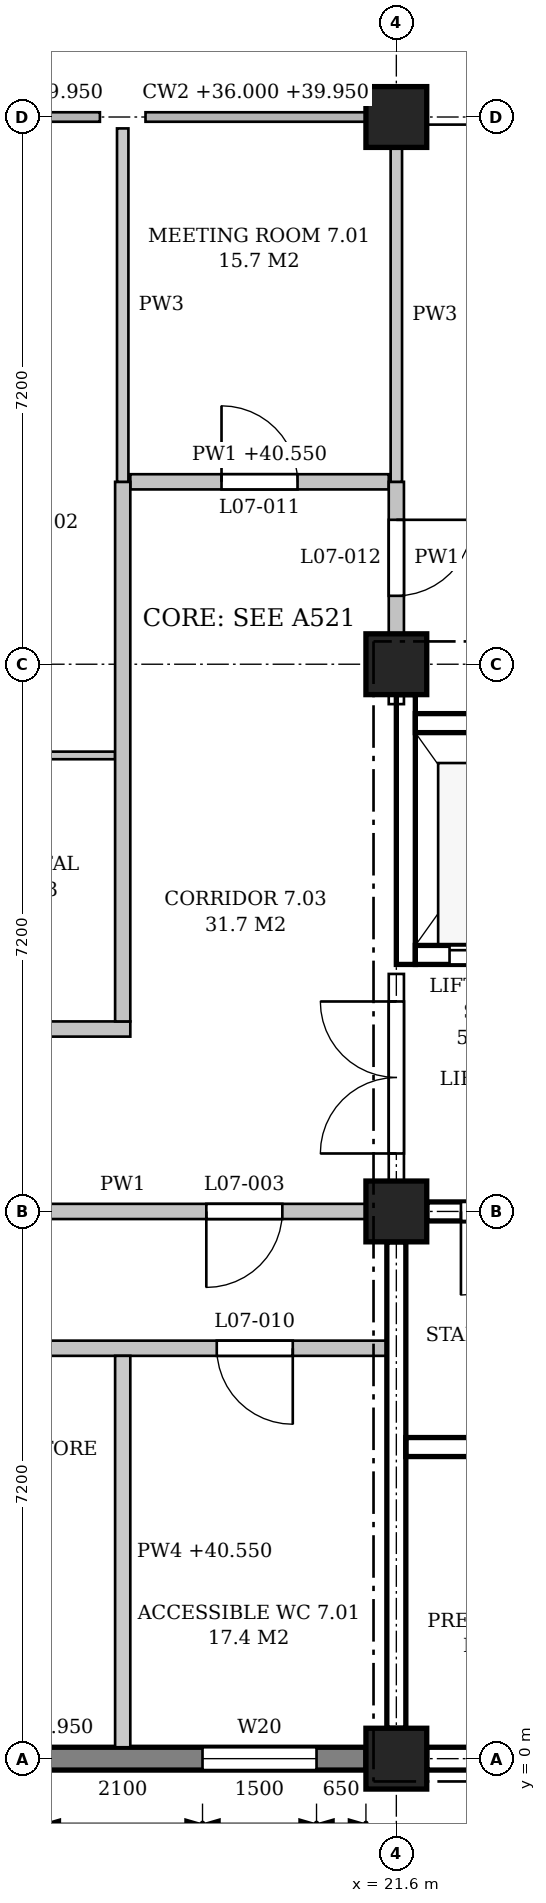
"""IFC4 building model, lengths in metres.
Left out: names, types, materials, properties, quantities, classifications, styles, units other than length and angle.
Written with IfcOpenShell. Run it as: python <this file> out.ifc"""

import sys

from ifc_helpers import new_model, si_unit, direction, frame, frame_2d, origin, origin_2d, place, context, subcontext, project, spatial, polyline, rectangle, outline, extrude, element, fill, save


model = new_model("IFC4")
c1 = context("Model", 3, precision=1e-05, world=origin(), true_north=direction((0.0, 1.0)))
c2 = subcontext(c1, "Body", "Model", "MODEL_VIEW")
j1 = project(units=[si_unit("LENGTHUNIT", "METRE"), si_unit("PLANEANGLEUNIT", "RADIAN")], contexts=[c1])
p1 = place(None, origin())
s1 = spatial("IfcSite", under=j1, at=p1, CompositionType="ELEMENT")
p2 = place(p1, origin())
s2 = spatial("IfcBuilding", under=s1, at=p2, CompositionType="ELEMENT")
p3 = place(p2, frame((0.0, 0.0, 36.0)))
s3 = spatial("IfcBuildingStorey", under=s2, at=p3, CompositionType="ELEMENT", Elevation=36.0)
for number, where, z_axis, x_axis in (
    (1, (21.6, 0.0, 0.0), (0.0, 0.0, 1.0), (1.0, 0.0, 0.0)),
    (2, (21.6, 7.2, 0.0), (0.0, 0.0, 1.0), (1.0, 0.0, 0.0)),
    (3, (21.6, 14.4, 0.0), (0.0, 0.0, 1.0), (1.0, 0.0, 0.0)),
    (4, (21.6, 21.6, 0.0), (0.0, 0.0, 1.0), (1.0, 0.0, 0.0)),
):
    element("IfcColumn", number, at=place(p3, frame(where, z_axis=z_axis, x_axis=x_axis)), inside=s3, PredefinedType="COLUMN", context=c2, shape_type="SweptSolid", body=[
        extrude(rectangle(XDim=0.8, YDim=0.8, at=origin_2d()), origin(), (0.0, 0.0, 1.0), 4.8),
    ])
p4 = place(p3, frame((14.8, 0.0, 0.0), z_axis=(0.0, 0.0, 1.0), x_axis=(1.0, 0.0, 0.0)))
e5 = element("IfcWall", 5, at=p4, inside=s3, PredefinedType="STANDARD", context=c2, shape_type="SweptSolid", body=[
    extrude(rectangle(XDim=6.4, YDim=0.3, at=frame_2d((3.2, 0.0))), origin(), (0.0, 0.0, 1.0), 3.95),
])
p5 = place(p4, frame((0.65, 0.0, 0.9)))
e6 = element("IfcOpeningElement", 6, at=p5, cuts=e5, PredefinedType="OPENING", context=c2, shape_type="SweptSolid", body=[
    extrude(outline(polyline([(0.0, 0.0), (1.5, 0.0), (1.5, 2.25), (0.75, 3.0), (0.0, 2.25), (0.0, 0.0)])), frame((0.0, 0.16, 0.0), z_axis=(0.0, -1.0, 0.0), x_axis=(1.0, 0.0, 0.0)), (0.0, 0.0, 1.0), 0.32),
])
p6 = place(p4, frame((4.25, 0.0, 0.9)))
e7 = element("IfcOpeningElement", 7, at=p6, cuts=e5, PredefinedType="OPENING", context=c2, shape_type="SweptSolid", body=[
    extrude(outline(polyline([(0.0, 0.0), (1.5, 0.0), (1.5, 2.25), (0.75, 3.0), (0.0, 2.25), (0.0, 0.0)])), frame((0.0, 0.16, 0.0), z_axis=(0.0, -1.0, 0.0), x_axis=(1.0, 0.0, 0.0)), (0.0, 0.0, 1.0), 0.32),
])
p7 = place(p3, frame((22.0, 0.0, 0.0), z_axis=(0.0, 0.0, 1.0), x_axis=(1.0, 0.0, 0.0)))
e8 = element("IfcWall", 8, at=p7, inside=s3, PredefinedType="STANDARD", context=c2, shape_type="SweptSolid", body=[
    extrude(rectangle(XDim=6.4, YDim=0.3, at=frame_2d((3.2, 0.0))), origin(), (0.0, 0.0, 1.0), 3.95),
])
p8 = place(p7, frame((4.55, 0.0, 0.9)))
e9 = element("IfcOpeningElement", 9, at=p8, cuts=e8, PredefinedType="OPENING", context=c2, shape_type="SweptSolid", body=[
    extrude(outline(polyline([(0.0, 0.0), (0.9, 0.0), (0.9, 2.55), (0.45, 3.0), (0.0, 2.55), (0.0, 0.0)])), frame((0.0, 0.16, 0.0), z_axis=(0.0, -1.0, 0.0), x_axis=(1.0, 0.0, 0.0)), (0.0, 0.0, 1.0), 0.32),
])
p9 = place(p3, frame((22.0, 7.2, 0.0), z_axis=(0.0, 0.0, 1.0), x_axis=(1.0, 0.0, 0.0)))
e10 = element("IfcWall", 10, at=p9, inside=s3, PredefinedType="SHEAR", context=c2, shape_type="SweptSolid", body=[
    extrude(rectangle(XDim=6.4, YDim=0.25, at=frame_2d((3.2, 0.0))), origin(), (0.0, 0.0, 1.0), 3.85),
])
p10 = place(p9, frame((0.45, 0.0, 0.0)))
e11 = element("IfcOpeningElement", 11, at=p10, cuts=e10, PredefinedType="OPENING", context=c2, shape_type="SweptSolid", body=[
    extrude(rectangle(XDim=1.1, YDim=2.1, at=frame_2d((0.55, 1.05))), frame((0.0, 0.135, 0.0), z_axis=(0.0, -1.0, 0.0), x_axis=(1.0, 0.0, 0.0)), (0.0, 0.0, 1.0), 0.27),
])
p11 = place(p3, frame((21.6, 0.4, 0.0), z_axis=(0.0, 0.0, 1.0), x_axis=(0.0, 1.0, 0.0)))
e12 = element("IfcWall", 12, at=p11, inside=s3, PredefinedType="SHEAR", context=c2, shape_type="SweptSolid", body=[
    extrude(rectangle(XDim=6.4, YDim=0.25, at=frame_2d((3.2, 0.0))), origin(), (0.0, 0.0, 1.0), 3.85),
])
p12 = place(p3, frame((21.725, 4.1, 0.0), z_axis=(0.0, 0.0, 1.0), x_axis=(1.0, 0.0, 0.0)))
e13 = element("IfcWall", 13, at=p12, inside=s3, PredefinedType="SHEAR", context=c2, shape_type="SweptSolid", body=[
    extrude(rectangle(XDim=2.975, YDim=0.25, at=frame_2d((1.487, 0.0))), origin(), (0.0, 0.0, 1.0), 4.55),
])
p13 = place(p12, frame((1.525, 0.0, 0.0)))
e14 = element("IfcOpeningElement", 14, at=p13, cuts=e13, PredefinedType="OPENING", context=c2, shape_type="SweptSolid", body=[
    extrude(rectangle(XDim=0.9, YDim=2.1, at=frame_2d((0.45, 1.05))), frame((0.0, 0.135, 0.0), z_axis=(0.0, -1.0, 0.0), x_axis=(1.0, 0.0, 0.0)), (0.0, 0.0, 1.0), 0.27),
])
p14 = place(p3, frame((21.725, 10.45, -0.25), z_axis=(0.0, 0.0, 1.0), x_axis=(0.0, 1.0, 0.0)))
e15 = element("IfcWall", 15, at=p14, inside=s3, PredefinedType="SHEAR", context=c2, shape_type="SweptSolid", body=[
    extrude(rectangle(XDim=3.55, YDim=0.25, at=frame_2d((1.775, 0.0))), origin(), (0.0, 0.0, 1.0), 4.1),
])
p15 = place(p3, frame((21.85, 10.575, -0.25), z_axis=(0.0, 0.0, 1.0), x_axis=(1.0, 0.0, 0.0)))
e16 = element("IfcWall", 16, at=p15, inside=s3, PredefinedType="SHEAR", context=c2, shape_type="SweptSolid", body=[
    extrude(rectangle(XDim=2.0, YDim=0.25, at=frame_2d((1.0, 0.0))), origin(), (0.0, 0.0, 1.0), 4.8),
])
p16 = place(p15, frame((0.45, 0.0, 0.25)))
e17 = element("IfcOpeningElement", 17, at=p16, cuts=e16, PredefinedType="OPENING", context=c2, shape_type="SweptSolid", body=[
    extrude(rectangle(XDim=1.1, YDim=2.1, at=frame_2d((0.55, 1.05))), frame((0.0, 0.135, 0.0), z_axis=(0.0, -1.0, 0.0), x_axis=(1.0, 0.0, 0.0)), (0.0, 0.0, 1.0), 0.27),
])
p17 = place(p3, frame((21.85, 13.625, -0.25), z_axis=(0.0, 0.0, 1.0), x_axis=(1.0, 0.0, 0.0)))
e18 = element("IfcWall", 18, at=p17, inside=s3, PredefinedType="SHEAR", context=c2, shape_type="SweptSolid", body=[
    extrude(rectangle(XDim=2.0, YDim=0.25, at=frame_2d((1.0, 0.0))), origin(), (0.0, 0.0, 1.0), 4.8),
])
p18 = place(p3, frame((7.325, 5.4, 0.0), z_axis=(0.0, 0.0, 1.0), x_axis=(1.0, 0.0, 0.0)))
e19 = element("IfcWall", 19, at=p18, inside=s3, PredefinedType="PARTITIONING", context=c2, shape_type="SweptSolid", body=[
    extrude(outline(polyline([(0.0, 0.0), (14.15, 0.0), (14.15, 3.85), (14.05, 3.85), (14.05, 4.55), (7.3, 4.55), (7.3, 3.85), (6.85, 3.85), (6.85, 4.55), (0.1, 4.55), (0.1, 3.85), (0.0, 3.85), (0.0, 0.0)])), frame((0.0, 0.1, 0.0), z_axis=(0.0, -1.0, 0.0), x_axis=(1.0, 0.0, 0.0)), (0.0, 0.0, 1.0), 0.2),
])
p19 = place(p18, frame((1.238, 0.0, 0.0)))
e20 = element("IfcOpeningElement", 20, at=p19, cuts=e19, PredefinedType="OPENING", context=c2, shape_type="SweptSolid", body=[
    extrude(rectangle(XDim=1.0, YDim=2.1, at=frame_2d((0.5, 1.05))), frame((0.0, 0.11, 0.0), z_axis=(0.0, -1.0, 0.0), x_axis=(1.0, 0.0, 0.0)), (0.0, 0.0, 1.0), 0.22),
])
p20 = place(p18, frame((4.775, 0.0, 0.0)))
e21 = element("IfcOpeningElement", 21, at=p20, cuts=e19, PredefinedType="OPENING", context=c2, shape_type="SweptSolid", body=[
    extrude(rectangle(XDim=1.0, YDim=2.1, at=frame_2d((0.5, 1.05))), frame((0.0, 0.11, 0.0), z_axis=(0.0, -1.0, 0.0), x_axis=(1.0, 0.0, 0.0)), (0.0, 0.0, 1.0), 0.22),
])
p21 = place(p18, frame((8.375, 0.0, 0.0)))
e22 = element("IfcOpeningElement", 22, at=p21, cuts=e19, PredefinedType="OPENING", context=c2, shape_type="SweptSolid", body=[
    extrude(rectangle(XDim=1.0, YDim=2.1, at=frame_2d((0.5, 1.05))), frame((0.0, 0.11, 0.0), z_axis=(0.0, -1.0, 0.0), x_axis=(1.0, 0.0, 0.0)), (0.0, 0.0, 1.0), 0.22),
])
p22 = place(p18, frame((11.913, 0.0, 0.0)))
e23 = element("IfcOpeningElement", 23, at=p22, cuts=e19, PredefinedType="OPENING", context=c2, shape_type="SweptSolid", body=[
    extrude(rectangle(XDim=1.0, YDim=2.1, at=frame_2d((0.5, 1.05))), frame((0.0, 0.11, 0.0), z_axis=(0.0, -1.0, 0.0), x_axis=(1.0, 0.0, 0.0)), (0.0, 0.0, 1.0), 0.22),
])
p23 = place(p3, frame((14.8, 7.2, 0.0), z_axis=(0.0, 0.0, 1.0), x_axis=(1.0, 0.0, 0.0)))
e24 = element("IfcWall", 24, at=p23, inside=s3, PredefinedType="PARTITIONING", context=c2, shape_type="SweptSolid", body=[
    extrude(rectangle(XDim=6.4, YDim=0.2, at=frame_2d((3.2, 0.0))), origin(), (0.0, 0.0, 1.0), 3.85),
])
p24 = place(p23, frame((4.3, 0.0, 0.0)))
e25 = element("IfcOpeningElement", 25, at=p24, cuts=e24, PredefinedType="OPENING", context=c2, shape_type="SweptSolid", body=[
    extrude(rectangle(XDim=1.0, YDim=2.1, at=frame_2d((0.5, 1.05))), frame((0.0, 0.11, 0.0), z_axis=(0.0, -1.0, 0.0), x_axis=(1.0, 0.0, 0.0)), (0.0, 0.0, 1.0), 0.22),
])
p25 = place(p3, frame((3.5, 9.6, 0.0), z_axis=(0.0, 0.0, 1.0), x_axis=(1.0, 0.0, 0.0)))
e26 = element("IfcWall", 26, at=p25, inside=s3, PredefinedType="PARTITIONING", context=c2, shape_type="SweptSolid", body=[
    extrude(outline(polyline([(0.0, 0.0), (14.6, 0.0), (14.6, 4.55), (11.125, 4.55), (11.125, 3.85), (10.675, 3.85), (10.675, 4.55), (3.925, 4.55), (3.925, 3.85), (3.475, 3.85), (3.475, 4.55), (0.0, 4.55), (0.0, 0.0)])), frame((0.0, 0.1, 0.0), z_axis=(0.0, -1.0, 0.0), x_axis=(1.0, 0.0, 0.0)), (0.0, 0.0, 1.0), 0.2),
])
p26 = place(p25, frame((1.4, 0.0, 0.0)))
e27 = element("IfcOpeningElement", 27, at=p26, cuts=e26, PredefinedType="OPENING", context=c2, shape_type="SweptSolid", body=[
    extrude(rectangle(XDim=1.0, YDim=2.1, at=frame_2d((0.5, 1.05))), frame((0.0, 0.11, 0.0), z_axis=(0.0, -1.0, 0.0), x_axis=(1.0, 0.0, 0.0)), (0.0, 0.0, 1.0), 0.22),
])
p27 = place(p25, frame((5.0, 0.0, 0.0)))
e28 = element("IfcOpeningElement", 28, at=p27, cuts=e26, PredefinedType="OPENING", context=c2, shape_type="SweptSolid", body=[
    extrude(rectangle(XDim=1.0, YDim=2.1, at=frame_2d((0.5, 1.05))), frame((0.0, 0.11, 0.0), z_axis=(0.0, -1.0, 0.0), x_axis=(1.0, 0.0, 0.0)), (0.0, 0.0, 1.0), 0.22),
])
p28 = place(p25, frame((10.4, 0.0, 0.0)))
e29 = element("IfcOpeningElement", 29, at=p28, cuts=e26, PredefinedType="OPENING", context=c2, shape_type="SweptSolid", body=[
    extrude(rectangle(XDim=1.0, YDim=2.1, at=frame_2d((0.5, 1.05))), frame((0.0, 0.11, 0.0), z_axis=(0.0, -1.0, 0.0), x_axis=(1.0, 0.0, 0.0)), (0.0, 0.0, 1.0), 0.22),
])
p29 = place(p3, frame((10.875, 13.2, 0.0), z_axis=(0.0, 0.0, 1.0), x_axis=(1.0, 0.0, 0.0)))
e30 = element("IfcWall", 30, at=p29, inside=s3, PredefinedType="PARTITIONING", context=c2, shape_type="SweptSolid", body=[
    extrude(rectangle(XDim=7.025, YDim=0.1, at=frame_2d((3.512, 0.0))), origin(), (0.0, 0.0, 1.0), 3.85),
])
p30 = place(p29, frame((1.262, 0.0, 0.0)))
e31 = element("IfcOpeningElement", 31, at=p30, cuts=e30, PredefinedType="OPENING", context=c2, shape_type="SweptSolid", body=[
    extrude(rectangle(XDim=1.0, YDim=2.1, at=frame_2d((0.5, 1.05))), frame((0.0, 0.06, 0.0), z_axis=(0.0, -1.0, 0.0), x_axis=(1.0, 0.0, 0.0)), (0.0, 0.0, 1.0), 0.12),
])
p31 = place(p29, frame((4.775, 0.0, 0.0)))
e32 = element("IfcOpeningElement", 32, at=p31, cuts=e30, PredefinedType="OPENING", context=c2, shape_type="SweptSolid", body=[
    extrude(rectangle(XDim=1.0, YDim=2.1, at=frame_2d((0.5, 1.05))), frame((0.0, 0.06, 0.0), z_axis=(0.0, -1.0, 0.0), x_axis=(1.0, 0.0, 0.0)), (0.0, 0.0, 1.0), 0.12),
])
p32 = place(p3, frame((18.1, 16.8, 0.0), z_axis=(0.0, 0.0, 1.0), x_axis=(1.0, 0.0, 0.0)))
e33 = element("IfcWall", 33, at=p32, inside=s3, PredefinedType="PARTITIONING", context=c2, shape_type="SweptSolid", body=[
    extrude(outline(polyline([(0.0, 0.0), (3.4, 0.0), (3.4, 3.85), (3.275, 3.85), (3.275, 4.55), (0.0, 4.55), (0.0, 0.0)])), frame((0.0, 0.1, 0.0), z_axis=(0.0, -1.0, 0.0), x_axis=(1.0, 0.0, 0.0)), (0.0, 0.0, 1.0), 0.2),
])
p33 = place(p32, frame((1.2, 0.0, 0.0)))
e34 = element("IfcOpeningElement", 34, at=p33, cuts=e33, PredefinedType="OPENING", context=c2, shape_type="SweptSolid", body=[
    extrude(rectangle(XDim=1.0, YDim=2.1, at=frame_2d((0.5, 1.05))), frame((0.0, 0.11, 0.0), z_axis=(0.0, -1.0, 0.0), x_axis=(1.0, 0.0, 0.0)), (0.0, 0.0, 1.0), 0.22),
])
p34 = place(p3, frame((18.0, 0.15, 0.0), z_axis=(0.0, 0.0, 1.0), x_axis=(0.0, 1.0, 0.0)))
e35 = element("IfcWall", 35, at=p34, inside=s3, PredefinedType="PARTITIONING", context=c2, shape_type="SweptSolid", body=[
    extrude(outline(polyline([(0.0, 0.0), (5.15, 0.0), (5.15, 4.55), (0.05, 4.55), (0.05, 3.95), (0.0, 3.95), (0.0, 0.0)])), frame((0.0, 0.1, 0.0), z_axis=(0.0, -1.0, 0.0), x_axis=(1.0, 0.0, 0.0)), (0.0, 0.0, 1.0), 0.2),
])
p35 = place(p3, frame((18.0, 9.7, 0.0), z_axis=(0.0, 0.0, 1.0), x_axis=(0.0, 1.0, 0.0)))
e36 = element("IfcWall", 36, at=p35, inside=s3, PredefinedType="PARTITIONING", context=c2, shape_type="SweptSolid", body=[
    extrude(outline(polyline([(0.0, 0.0), (7.1, 0.0), (7.1, 4.55), (4.925, 4.55), (4.925, 3.85), (4.475, 3.85), (4.475, 4.55), (0.0, 4.55), (0.0, 0.0)])), frame((0.0, 0.1, 0.0), z_axis=(0.0, -1.0, 0.0), x_axis=(1.0, 0.0, 0.0)), (0.0, 0.0, 1.0), 0.2),
])
p36 = place(p3, frame((18.0, 16.8, 0.0), z_axis=(0.0, 0.0, 1.0), x_axis=(0.0, 1.0, 0.0)))
e37 = element("IfcWall", 37, at=p36, inside=s3, PredefinedType="PARTITIONING", context=c2, shape_type="SweptSolid", body=[
    extrude(rectangle(XDim=4.65, YDim=0.15, at=frame_2d((2.325, 0.0))), origin(), (0.0, 0.0, 1.0), 3.85),
])
p37 = place(p3, frame((21.6, 7.6, 0.0), z_axis=(0.0, 0.0, 1.0), x_axis=(0.0, 1.0, 0.0)))
e38 = element("IfcWall", 38, at=p37, inside=s3, PredefinedType="PARTITIONING", context=c2, shape_type="SweptSolid", body=[
    extrude(rectangle(XDim=2.725, YDim=0.2, at=frame_2d((1.362, 0.0))), origin(), (0.0, 0.0, 1.0), 3.85),
])
p38 = place(p37, frame((0.362, 0.0, 0.0)))
e39 = element("IfcOpeningElement", 39, at=p38, cuts=e38, PredefinedType="OPENING", context=c2, shape_type="SweptSolid", body=[
    extrude(rectangle(XDim=2.0, YDim=2.4, at=frame_2d((1.0, 1.2))), frame((0.0, 0.11, 0.0), z_axis=(0.0, -1.0, 0.0), x_axis=(1.0, 0.0, 0.0)), (0.0, 0.0, 1.0), 0.22),
])
p39 = place(p3, frame((21.6, 13.875, 0.0), z_axis=(0.0, 0.0, 1.0), x_axis=(0.0, 1.0, 0.0)))
e40 = element("IfcWall", 40, at=p39, inside=s3, PredefinedType="PARTITIONING", context=c2, shape_type="SweptSolid", body=[
    extrude(rectangle(XDim=0.125, YDim=0.2, at=frame_2d((0.062, 0.0))), origin(), (0.0, 0.0, 1.0), 3.85),
])
p40 = place(p3, frame((21.6, 14.8, 0.0), z_axis=(0.0, 0.0, 1.0), x_axis=(0.0, 1.0, 0.0)))
e41 = element("IfcWall", 41, at=p40, inside=s3, PredefinedType="PARTITIONING", context=c2, shape_type="SweptSolid", body=[
    extrude(rectangle(XDim=2.0, YDim=0.2, at=frame_2d((1.0, 0.0))), origin(), (0.0, 0.0, 1.0), 3.85),
])
p41 = place(p40, frame((0.5, 0.0, 0.0)))
e42 = element("IfcOpeningElement", 42, at=p41, cuts=e41, PredefinedType="OPENING", context=c2, shape_type="SweptSolid", body=[
    extrude(rectangle(XDim=1.0, YDim=2.1, at=frame_2d((0.5, 1.05))), frame((0.0, 0.11, 0.0), z_axis=(0.0, -1.0, 0.0), x_axis=(1.0, 0.0, 0.0)), (0.0, 0.0, 1.0), 0.22),
])
p42 = place(p3, frame((21.6, 16.8, 0.0), z_axis=(0.0, 0.0, 1.0), x_axis=(0.0, 1.0, 0.0)))
e43 = element("IfcWall", 43, at=p42, inside=s3, PredefinedType="PARTITIONING", context=c2, shape_type="SweptSolid", body=[
    extrude(rectangle(XDim=4.4, YDim=0.15, at=frame_2d((2.2, 0.0))), origin(), (0.0, 0.0, 1.0), 3.85),
])
p43 = place(p6, origin())
e44 = element("IfcWindow", 44, at=p43, inside=s3, PartitioningType="SINGLE_PANEL", PredefinedType="WINDOW", context=c2, shape_type="SweptSolid", body=[
    extrude(outline(polyline([(0.0, 0.0), (1.5, 0.0), (1.5, 2.25), (0.75, 3.0), (0.0, 2.25), (0.0, 0.0)])), frame((0.0, 0.03, 0.0), z_axis=(0.0, -1.0, 0.0), x_axis=(1.0, 0.0, 0.0)), (0.0, 0.0, 1.0), 0.06),
])
fill(e7, e44)
p44 = place(p10, frame((1.1, 0.0, 0.0), z_axis=(0.0, 0.0, 1.0), x_axis=(-1.0, 0.0, 0.0)))
e45 = element("IfcDoor", 45, at=p44, inside=s3, OperationType="SINGLE_SWING_RIGHT", PredefinedType="DOOR", context=c2, shape_type="SweptSolid", body=[
    extrude(rectangle(XDim=1.1, YDim=2.1, at=frame_2d((0.55, 1.05))), frame((0.0, 0.025, 0.0), z_axis=(0.0, -1.0, 0.0), x_axis=(1.0, 0.0, 0.0)), (0.0, 0.0, 1.0), 0.05),
])
fill(e11, e45)
p45 = place(p16, origin())
e46 = element("IfcDoor", 46, at=p45, inside=s3, OperationType="SLIDING_TO_LEFT", PredefinedType="DOOR", context=c2, shape_type="SweptSolid", body=[
    extrude(rectangle(XDim=1.1, YDim=2.1, at=frame_2d((0.55, 1.05))), frame((0.0, 0.025, 0.0), z_axis=(0.0, -1.0, 0.0), x_axis=(1.0, 0.0, 0.0)), (0.0, 0.0, 1.0), 0.05),
])
fill(e17, e46)
p46 = place(p38, origin())
e47 = element("IfcDoor", 47, at=p46, inside=s3, OperationType="DOUBLE_DOOR_SINGLE_SWING", PredefinedType="DOOR", context=c2, shape_type="SweptSolid", body=[
    extrude(rectangle(XDim=2.0, YDim=2.4, at=frame_2d((1.0, 1.2))), frame((0.0, 0.025, 0.0), z_axis=(0.0, -1.0, 0.0), x_axis=(1.0, 0.0, 0.0)), (0.0, 0.0, 1.0), 0.05),
])
fill(e39, e47)
p47 = place(p24, frame((1.0, 0.0, 0.0), z_axis=(0.0, 0.0, 1.0), x_axis=(-1.0, 0.0, 0.0)))
e48 = element("IfcDoor", 48, at=p47, inside=s3, OperationType="SINGLE_SWING_RIGHT", PredefinedType="DOOR", context=c2, shape_type="SweptSolid", body=[
    extrude(rectangle(XDim=1.0, YDim=2.1, at=frame_2d((0.5, 1.05))), frame((0.0, 0.025, 0.0), z_axis=(0.0, -1.0, 0.0), x_axis=(1.0, 0.0, 0.0)), (0.0, 0.0, 1.0), 0.05),
])
fill(e25, e48)
p48 = place(p22, frame((1.0, 0.0, 0.0), z_axis=(0.0, 0.0, 1.0), x_axis=(-1.0, 0.0, 0.0)))
e49 = element("IfcDoor", 49, at=p48, inside=s3, OperationType="SINGLE_SWING_LEFT", PredefinedType="DOOR", context=c2, shape_type="SweptSolid", body=[
    extrude(rectangle(XDim=1.0, YDim=2.1, at=frame_2d((0.5, 1.05))), frame((0.0, 0.025, 0.0), z_axis=(0.0, -1.0, 0.0), x_axis=(1.0, 0.0, 0.0)), (0.0, 0.0, 1.0), 0.05),
])
fill(e23, e49)
p49 = place(p33, origin())
e50 = element("IfcDoor", 50, at=p49, inside=s3, OperationType="SINGLE_SWING_LEFT", PredefinedType="DOOR", context=c2, shape_type="SweptSolid", body=[
    extrude(rectangle(XDim=1.0, YDim=2.1, at=frame_2d((0.5, 1.05))), frame((0.0, 0.025, 0.0), z_axis=(0.0, -1.0, 0.0), x_axis=(1.0, 0.0, 0.0)), (0.0, 0.0, 1.0), 0.05),
])
fill(e34, e50)
p50 = place(p41, frame((1.0, 0.0, 0.0), z_axis=(0.0, 0.0, 1.0), x_axis=(-1.0, 0.0, 0.0)))
e51 = element("IfcDoor", 51, at=p50, inside=s3, OperationType="SINGLE_SWING_LEFT", PredefinedType="DOOR", context=c2, shape_type="SweptSolid", body=[
    extrude(rectangle(XDim=1.0, YDim=2.1, at=frame_2d((0.5, 1.05))), frame((0.0, 0.025, 0.0), z_axis=(0.0, -1.0, 0.0), x_axis=(1.0, 0.0, 0.0)), (0.0, 0.0, 1.0), 0.05),
])
fill(e42, e51)
save(model, sys.argv[1])
